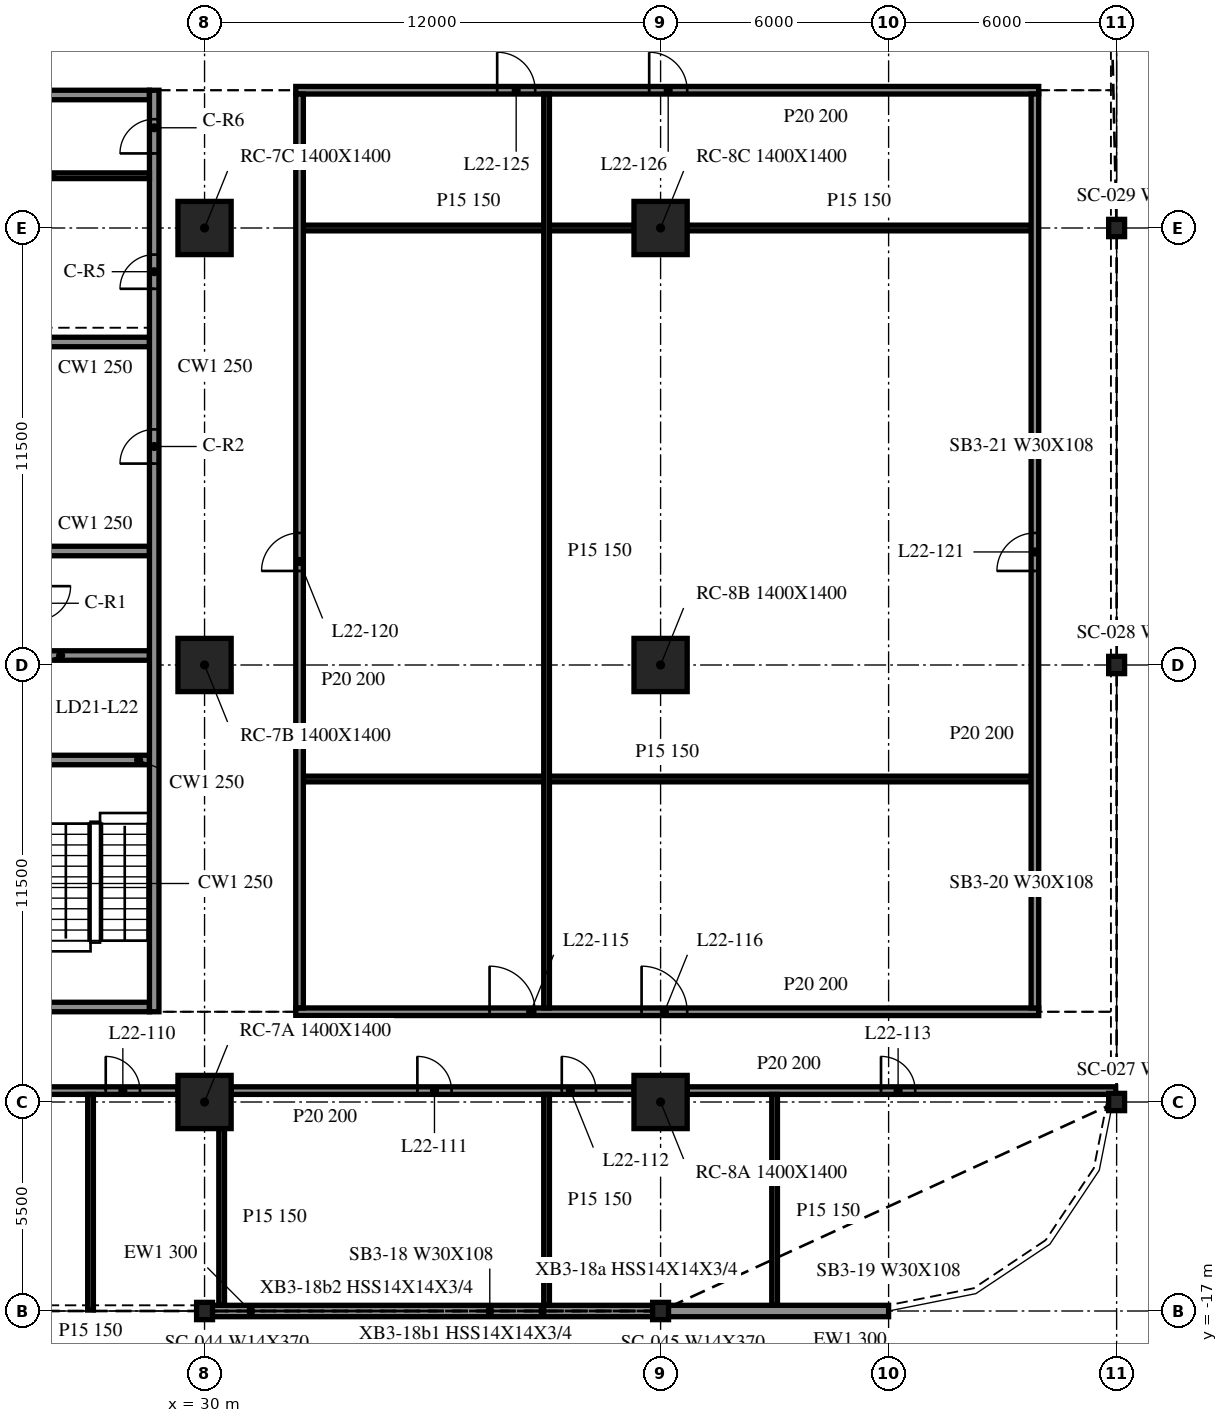
"""IFC4 building model, lengths in metres.
Left out: names, types, materials, properties, quantities, classifications, styles, units other than length and angle.
Written with IfcOpenShell. Run it as: python <this file> out.ifc"""

import sys

from ifc_helpers import new_model, si_unit, direction, frame, frame_2d, origin, origin_2d, place, context, subcontext, project, spatial, rectangle, i_section, extrude, element, fill, save


model = new_model("IFC4")
c1 = context("Model", 3, precision=1e-05, world=origin(), true_north=direction((0.0, 1.0)))
c2 = subcontext(c1, "Body", "Model", "MODEL_VIEW")
j1 = project(units=[si_unit("LENGTHUNIT", "METRE"), si_unit("PLANEANGLEUNIT", "RADIAN")], contexts=[c1])
p1 = place(None, origin())
s1 = spatial("IfcSite", under=j1, at=p1, CompositionType="ELEMENT")
p2 = place(p1, origin())
s2 = spatial("IfcBuilding", under=s1, at=p2, CompositionType="ELEMENT")
p3 = place(p2, frame((0.0, 0.0, 97.1)))
s3 = spatial("IfcBuildingStorey", under=s2, at=p3, CompositionType="ELEMENT", Elevation=97.1)
for number, where, z_axis, x_axis in (
    (1, (30.0, -11.5, -0.34), (0.0, 0.0, 1.0), (1.0, 0.0, 0.0)),
    (2, (30.0, 0.0, -0.34), (0.0, 0.0, 1.0), (1.0, 0.0, 0.0)),
    (3, (30.0, 11.5, -0.34), (0.0, 0.0, 1.0), (1.0, 0.0, 0.0)),
    (4, (42.0, -11.5, -0.34), (0.0, 0.0, 1.0), (1.0, 0.0, 0.0)),
    (5, (42.0, 0.0, -0.34), (0.0, 0.0, 1.0), (1.0, 0.0, 0.0)),
    (6, (42.0, 11.5, -0.34), (0.0, 0.0, 1.0), (1.0, 0.0, 0.0)),
):
    element("IfcColumn", number, at=place(p3, frame(where, z_axis=z_axis, x_axis=x_axis)), inside=s3, PredefinedType="COLUMN", context=c2, shape_type="SweptSolid", body=[
        extrude(rectangle(XDim=1.4, YDim=1.4, at=origin_2d()), origin(), (0.0, 0.0, 1.0), 4.1),
    ])
for number, where, z_axis, x_axis in (
    (7, (30.0, -17.0, -0.34), (0.0, 0.0, 1.0), (1.0, 0.0, 0.0)),
    (8, (42.0, -17.0, -0.34), (0.0, 0.0, 1.0), (1.0, 0.0, 0.0)),
    (9, (54.0, -11.5, -0.34), (0.0, 0.0, 1.0), (1.0, 0.0, 0.0)),
    (10, (54.0, 0.0, -0.34), (0.0, 0.0, 1.0), (1.0, 0.0, 0.0)),
    (11, (54.0, 11.5, -0.34), (0.0, 0.0, 1.0), (1.0, 0.0, 0.0)),
):
    element("IfcColumn", number, at=place(p3, frame(where, z_axis=z_axis, x_axis=x_axis)), inside=s3, PredefinedType="COLUMN", context=c2, shape_type="SweptSolid", body=[
        extrude(i_section(OverallWidth=0.419, OverallDepth=0.455, WebThickness=0.042, FlangeThickness=0.068, at=origin_2d()), origin(), (0.0, 0.0, 1.0), 4.1),
    ])
p4 = place(p3, frame((30.021, -17.0, 0.0), z_axis=(0.0, 0.0, 1.0), x_axis=(1.0, 0.0, 0.0)))
e12 = element("IfcWall", 12, at=p4, inside=s3, PredefinedType="NOTDEFINED", context=c2, shape_type="SweptSolid", body=[
    extrude(rectangle(XDim=11.958, YDim=0.3, at=frame_2d((5.979, 0.0))), origin(), (0.0, 0.0, 1.0), 3.003),
])
p5 = place(p3, frame((42.021, -17.0, 0.0), z_axis=(0.0, 0.0, 1.0), x_axis=(1.0, 0.0, 0.0)))
e13 = element("IfcWall", 13, at=p5, inside=s3, PredefinedType="NOTDEFINED", context=c2, shape_type="SweptSolid", body=[
    extrude(rectangle(XDim=5.979, YDim=0.3, at=frame_2d((2.99, 0.0))), origin(), (0.0, 0.0, 1.0), 3.003),
])
p6 = place(p3, frame((28.675, -9.125, 0.0), z_axis=(0.0, 0.0, 1.0), x_axis=(0.0, 1.0, 0.0)))
e14 = element("IfcWall", 14, at=p6, inside=s3, PredefinedType="SOLIDWALL", context=c2, shape_type="SweptSolid", body=[
    extrude(rectangle(XDim=24.25, YDim=0.25, at=frame_2d((12.125, 0.0))), origin(), (0.0, 0.0, 1.0), 3.76),
])
p7 = place(p6, frame((14.425, 0.0, 0.0)))
e15 = element("IfcOpeningElement", 15, at=p7, cuts=e14, PredefinedType="OPENING", context=c2, shape_type="SweptSolid", body=[
    extrude(rectangle(XDim=0.9, YDim=2.1, at=frame_2d((0.45, 1.05))), frame((0.0, 0.135, 0.0), z_axis=(0.0, -1.0, 0.0), x_axis=(1.0, 0.0, 0.0)), (0.0, 0.0, 1.0), 0.27),
])
p8 = place(p6, frame((19.025, 0.0, 0.0)))
e16 = element("IfcOpeningElement", 16, at=p8, cuts=e14, PredefinedType="OPENING", context=c2, shape_type="SweptSolid", body=[
    extrude(rectangle(XDim=0.9, YDim=2.1, at=frame_2d((0.45, 1.05))), frame((0.0, 0.135, 0.0), z_axis=(0.0, -1.0, 0.0), x_axis=(1.0, 0.0, 0.0)), (0.0, 0.0, 1.0), 0.27),
])
p9 = place(p6, frame((22.587, 0.0, 0.0)))
e17 = element("IfcOpeningElement", 17, at=p9, cuts=e14, PredefinedType="OPENING", context=c2, shape_type="SweptSolid", body=[
    extrude(rectangle(XDim=0.9, YDim=2.1, at=frame_2d((0.45, 1.05))), frame((0.0, 0.135, 0.0), z_axis=(0.0, -1.0, 0.0), x_axis=(1.0, 0.0, 0.0)), (0.0, 0.0, 1.0), 0.27),
])
p10 = place(p3, frame((28.55, -9.0, 0.0), z_axis=(0.0, 0.0, 1.0), x_axis=(-1.0, 0.0, 0.0)))
e18 = element("IfcWall", 18, at=p10, inside=s3, PredefinedType="SOLIDWALL", context=c2, shape_type="SweptSolid", body=[
    extrude(rectangle(XDim=9.1, YDim=0.25, at=frame_2d((4.55, 0.0))), origin(), (0.0, 0.0, 1.0), 3.76),
])
p11 = place(p10, frame((3.65, 0.0, 0.0)))
e19 = element("IfcOpeningElement", 19, at=p11, cuts=e18, PredefinedType="OPENING", context=c2, shape_type="SweptSolid", body=[
    extrude(rectangle(XDim=1.8, YDim=2.1, at=frame_2d((0.9, 1.05))), frame((0.0, 0.135, 0.0), z_axis=(0.0, -1.0, 0.0), x_axis=(1.0, 0.0, 0.0)), (0.0, 0.0, 1.0), 0.27),
])
p12 = place(p3, frame((19.45, 15.0, 0.0), z_axis=(0.0, 0.0, 1.0), x_axis=(1.0, 0.0, 0.0)))
e20 = element("IfcWall", 20, at=p12, inside=s3, PredefinedType="SOLIDWALL", context=c2, shape_type="SweptSolid", body=[
    extrude(rectangle(XDim=9.1, YDim=0.25, at=frame_2d((4.55, 0.0))), origin(), (0.0, 0.0, 1.0), 3.76),
])
p13 = place(p12, frame((3.65, 0.0, 0.0)))
e21 = element("IfcOpeningElement", 21, at=p13, cuts=e20, PredefinedType="OPENING", context=c2, shape_type="SweptSolid", body=[
    extrude(rectangle(XDim=1.8, YDim=2.1, at=frame_2d((0.9, 1.05))), frame((0.0, 0.135, 0.0), z_axis=(0.0, -1.0, 0.0), x_axis=(1.0, 0.0, 0.0)), (0.0, 0.0, 1.0), 0.27),
])
for number, where, z_axis, x_axis in (
    (22, (25.7, -2.5, 0.0), (0.0, 0.0, 1.0), (1.0, 0.0, 0.0)),
    (23, (25.7, 0.25, 0.0), (0.0, 0.0, 1.0), (1.0, 0.0, 0.0)),
    (24, (25.7, 3.0, 0.0), (0.0, 0.0, 1.0), (1.0, 0.0, 0.0)),
    (25, (25.7, 8.5, 0.0), (0.0, 0.0, 1.0), (1.0, 0.0, 0.0)),
):
    element("IfcWall", number, at=place(p3, frame(where, z_axis=z_axis, x_axis=x_axis)), inside=s3, PredefinedType="SOLIDWALL", context=c2, shape_type="SweptSolid", body=[
        extrude(rectangle(XDim=2.85, YDim=0.25, at=frame_2d((1.425, 0.0))), origin(), (0.0, 0.0, 1.0), 3.76),
    ])
p14 = place(p3, frame((25.7, 12.875, 0.0), z_axis=(0.0, 0.0, 1.0), x_axis=(1.0, 0.0, 0.0)))
e26 = element("IfcWall", 26, at=p14, inside=s3, PredefinedType="PARTITIONING", context=c2, shape_type="SweptSolid", body=[
    extrude(rectangle(XDim=2.85, YDim=0.15, at=frame_2d((1.425, 0.0))), origin(), (0.0, 0.0, 1.0), 3.76),
])
p15 = place(p3, frame((18.7, -11.2, 0.0), z_axis=(0.0, 0.0, 1.0), x_axis=(1.0, 0.0, 0.0)))
e27 = element("IfcWall", 27, at=p15, inside=s3, PredefinedType="PARTITIONING", context=c2, shape_type="SweptSolid", body=[
    extrude(rectangle(XDim=10.6, YDim=0.2, at=frame_2d((5.3, 0.0))), origin(), (0.0, 0.0, 1.0), 3.76),
])
p16 = place(p15, frame((4.9, 0.0, 0.0)))
e28 = element("IfcOpeningElement", 28, at=p16, cuts=e27, PredefinedType="OPENING", context=c2, shape_type="SweptSolid", body=[
    extrude(rectangle(XDim=0.9, YDim=2.1, at=frame_2d((0.45, 1.05))), frame((0.0, 0.11, 0.0), z_axis=(0.0, -1.0, 0.0), x_axis=(1.0, 0.0, 0.0)), (0.0, 0.0, 1.0), 0.22),
])
p17 = place(p15, frame((8.7, 0.0, 0.0)))
e29 = element("IfcOpeningElement", 29, at=p17, cuts=e27, PredefinedType="OPENING", context=c2, shape_type="SweptSolid", body=[
    extrude(rectangle(XDim=0.9, YDim=2.1, at=frame_2d((0.45, 1.05))), frame((0.0, 0.11, 0.0), z_axis=(0.0, -1.0, 0.0), x_axis=(1.0, 0.0, 0.0)), (0.0, 0.0, 1.0), 0.22),
])
p18 = place(p3, frame((30.7, -11.2, 0.0), z_axis=(0.0, 0.0, 1.0), x_axis=(1.0, 0.0, 0.0)))
e30 = element("IfcWall", 30, at=p18, inside=s3, PredefinedType="PARTITIONING", context=c2, shape_type="SweptSolid", body=[
    extrude(rectangle(XDim=10.6, YDim=0.2, at=frame_2d((5.3, 0.0))), origin(), (0.0, 0.0, 1.0), 3.76),
])
p19 = place(p18, frame((4.9, 0.0, 0.0)))
e31 = element("IfcOpeningElement", 31, at=p19, cuts=e30, PredefinedType="OPENING", context=c2, shape_type="SweptSolid", body=[
    extrude(rectangle(XDim=0.9, YDim=2.1, at=frame_2d((0.45, 1.05))), frame((0.0, 0.11, 0.0), z_axis=(0.0, -1.0, 0.0), x_axis=(1.0, 0.0, 0.0)), (0.0, 0.0, 1.0), 0.22),
])
p20 = place(p18, frame((8.7, 0.0, 0.0)))
e32 = element("IfcOpeningElement", 32, at=p20, cuts=e30, PredefinedType="OPENING", context=c2, shape_type="SweptSolid", body=[
    extrude(rectangle(XDim=0.9, YDim=2.1, at=frame_2d((0.45, 1.05))), frame((0.0, 0.11, 0.0), z_axis=(0.0, -1.0, 0.0), x_axis=(1.0, 0.0, 0.0)), (0.0, 0.0, 1.0), 0.22),
])
p21 = place(p3, frame((42.7, -11.2, 0.0), z_axis=(0.0, 0.0, 1.0), x_axis=(1.0, 0.0, 0.0)))
e33 = element("IfcWall", 33, at=p21, inside=s3, PredefinedType="PARTITIONING", context=c2, shape_type="SweptSolid", body=[
    extrude(rectangle(XDim=11.275, YDim=0.2, at=frame_2d((5.638, 0.0))), origin(), (0.0, 0.0, 1.0), 3.76),
])
p22 = place(p21, frame((5.1, 0.0, 0.0)))
e34 = element("IfcOpeningElement", 34, at=p22, cuts=e33, PredefinedType="OPENING", context=c2, shape_type="SweptSolid", body=[
    extrude(rectangle(XDim=0.9, YDim=2.1, at=frame_2d((0.45, 1.05))), frame((0.0, 0.11, 0.0), z_axis=(0.0, -1.0, 0.0), x_axis=(1.0, 0.0, 0.0)), (0.0, 0.0, 1.0), 0.22),
])
p23 = place(p3, frame((32.4, -9.125, 0.0), z_axis=(0.0, 0.0, 1.0), x_axis=(1.0, 0.0, 0.0)))
e35 = element("IfcWall", 35, at=p23, inside=s3, PredefinedType="PARTITIONING", context=c2, shape_type="SweptSolid", body=[
    extrude(rectangle(XDim=19.55, YDim=0.2, at=frame_2d((9.775, 0.0))), origin(), (0.0, 0.0, 1.0), 3.76),
])
p24 = place(p23, frame((5.1, 0.0, 0.0)))
e36 = element("IfcOpeningElement", 36, at=p24, cuts=e35, PredefinedType="OPENING", context=c2, shape_type="SweptSolid", body=[
    extrude(rectangle(XDim=1.2, YDim=2.1, at=frame_2d((0.6, 1.05))), frame((0.0, 0.11, 0.0), z_axis=(0.0, -1.0, 0.0), x_axis=(1.0, 0.0, 0.0)), (0.0, 0.0, 1.0), 0.22),
])
p25 = place(p23, frame((9.1, 0.0, 0.0)))
e37 = element("IfcOpeningElement", 37, at=p25, cuts=e35, PredefinedType="OPENING", context=c2, shape_type="SweptSolid", body=[
    extrude(rectangle(XDim=1.2, YDim=2.1, at=frame_2d((0.6, 1.05))), frame((0.0, 0.11, 0.0), z_axis=(0.0, -1.0, 0.0), x_axis=(1.0, 0.0, 0.0)), (0.0, 0.0, 1.0), 0.22),
])
p26 = place(p3, frame((32.6, -3.0, 0.0), z_axis=(0.0, 0.0, 1.0), x_axis=(1.0, 0.0, 0.0)))
e38 = element("IfcWall", 38, at=p26, inside=s3, PredefinedType="PARTITIONING", context=c2, shape_type="SweptSolid", body=[
    extrude(rectangle(XDim=19.15, YDim=0.15, at=frame_2d((9.575, 0.0))), origin(), (0.0, 0.0, 1.0), 3.76),
])
p27 = place(p3, frame((32.6, 11.5, 0.0), z_axis=(0.0, 0.0, 1.0), x_axis=(1.0, 0.0, 0.0)))
e39 = element("IfcWall", 39, at=p27, inside=s3, PredefinedType="PARTITIONING", context=c2, shape_type="SweptSolid", body=[
    extrude(rectangle(XDim=8.7, YDim=0.15, at=frame_2d((4.35, 0.0))), origin(), (0.0, 0.0, 1.0), 3.76),
])
p28 = place(p3, frame((42.7, 11.5, 0.0), z_axis=(0.0, 0.0, 1.0), x_axis=(1.0, 0.0, 0.0)))
e40 = element("IfcWall", 40, at=p28, inside=s3, PredefinedType="PARTITIONING", context=c2, shape_type="SweptSolid", body=[
    extrude(rectangle(XDim=9.05, YDim=0.15, at=frame_2d((4.525, 0.0))), origin(), (0.0, 0.0, 1.0), 3.76),
])
p29 = place(p3, frame((32.4, 15.125, 0.0), z_axis=(0.0, 0.0, 1.0), x_axis=(1.0, 0.0, 0.0)))
e41 = element("IfcWall", 41, at=p29, inside=s3, PredefinedType="PARTITIONING", context=c2, shape_type="SweptSolid", body=[
    extrude(rectangle(XDim=19.55, YDim=0.2, at=frame_2d((9.775, 0.0))), origin(), (0.0, 0.0, 1.0), 3.76),
])
p30 = place(p29, frame((5.3, 0.0, 0.0)))
e42 = element("IfcOpeningElement", 42, at=p30, cuts=e41, PredefinedType="OPENING", context=c2, shape_type="SweptSolid", body=[
    extrude(rectangle(XDim=1.0, YDim=2.1, at=frame_2d((0.5, 1.05))), frame((0.0, 0.11, 0.0), z_axis=(0.0, -1.0, 0.0), x_axis=(1.0, 0.0, 0.0)), (0.0, 0.0, 1.0), 0.22),
])
p31 = place(p29, frame((9.3, 0.0, 0.0)))
e43 = element("IfcOpeningElement", 43, at=p31, cuts=e41, PredefinedType="OPENING", context=c2, shape_type="SweptSolid", body=[
    extrude(rectangle(XDim=1.0, YDim=2.1, at=frame_2d((0.5, 1.05))), frame((0.0, 0.11, 0.0), z_axis=(0.0, -1.0, 0.0), x_axis=(1.0, 0.0, 0.0)), (0.0, 0.0, 1.0), 0.22),
])
p32 = place(p3, frame((27.0, -16.975, 0.0), z_axis=(0.0, 0.0, 1.0), x_axis=(0.0, 1.0, 0.0)))
e44 = element("IfcWall", 44, at=p32, inside=s3, PredefinedType="PARTITIONING", context=c2, shape_type="SweptSolid", body=[
    extrude(rectangle(XDim=5.675, YDim=0.15, at=frame_2d((2.837, 0.0))), origin(), (0.0, 0.0, 1.0), 3.76),
])
p33 = place(p3, frame((30.45, -16.85, 0.0), z_axis=(0.0, 0.0, 1.0), x_axis=(0.0, 1.0, 0.0)))
e45 = element("IfcWall", 45, at=p33, inside=s3, PredefinedType="PARTITIONING", context=c2, shape_type="SweptSolid", body=[
    extrude(rectangle(XDim=4.65, YDim=0.15, at=frame_2d((2.325, 0.0))), origin(), (0.0, 0.0, 1.0), 3.76),
])
p34 = place(p3, frame((32.5, -9.025, 0.0), z_axis=(0.0, 0.0, 1.0), x_axis=(0.0, 1.0, 0.0)))
e46 = element("IfcWall", 46, at=p34, inside=s3, PredefinedType="PARTITIONING", context=c2, shape_type="SweptSolid", body=[
    extrude(rectangle(XDim=24.05, YDim=0.2, at=frame_2d((12.025, 0.0))), origin(), (0.0, 0.0, 1.0), 3.76),
])
p35 = place(p34, frame((11.5, 0.0, 0.0)))
e47 = element("IfcOpeningElement", 47, at=p35, cuts=e46, PredefinedType="OPENING", context=c2, shape_type="SweptSolid", body=[
    extrude(rectangle(XDim=1.0, YDim=2.1, at=frame_2d((0.5, 1.05))), frame((0.0, 0.11, 0.0), z_axis=(0.0, -1.0, 0.0), x_axis=(1.0, 0.0, 0.0)), (0.0, 0.0, 1.0), 0.22),
])
p36 = place(p3, frame((39.0, -16.85, 0.0), z_axis=(0.0, 0.0, 1.0), x_axis=(0.0, 1.0, 0.0)))
e48 = element("IfcWall", 48, at=p36, inside=s3, PredefinedType="PARTITIONING", context=c2, shape_type="SweptSolid", body=[
    extrude(rectangle(XDim=5.55, YDim=0.15, at=frame_2d((2.775, 0.0))), origin(), (0.0, 0.0, 1.0), 3.76),
])
p37 = place(p3, frame((39.0, -9.025, 0.0), z_axis=(0.0, 0.0, 1.0), x_axis=(0.0, 1.0, 0.0)))
e49 = element("IfcWall", 49, at=p37, inside=s3, PredefinedType="PARTITIONING", context=c2, shape_type="SweptSolid", body=[
    extrude(rectangle(XDim=24.05, YDim=0.15, at=frame_2d((12.025, 0.0))), origin(), (0.0, 0.0, 1.0), 3.76),
])
p38 = place(p3, frame((45.0, -16.85, 0.0), z_axis=(0.0, 0.0, 1.0), x_axis=(0.0, 1.0, 0.0)))
e50 = element("IfcWall", 50, at=p38, inside=s3, PredefinedType="PARTITIONING", context=c2, shape_type="SweptSolid", body=[
    extrude(rectangle(XDim=5.55, YDim=0.15, at=frame_2d((2.775, 0.0))), origin(), (0.0, 0.0, 1.0), 3.76),
])
p39 = place(p3, frame((51.85, -9.025, 0.0), z_axis=(0.0, 0.0, 1.0), x_axis=(0.0, 1.0, 0.0)))
e51 = element("IfcWall", 51, at=p39, inside=s3, PredefinedType="PARTITIONING", context=c2, shape_type="SweptSolid", body=[
    extrude(rectangle(XDim=24.05, YDim=0.2, at=frame_2d((12.025, 0.0))), origin(), (0.0, 0.0, 1.0), 3.76),
])
p40 = place(p39, frame((11.5, 0.0, 0.0)))
e52 = element("IfcOpeningElement", 52, at=p40, cuts=e51, PredefinedType="OPENING", context=c2, shape_type="SweptSolid", body=[
    extrude(rectangle(XDim=1.0, YDim=2.1, at=frame_2d((0.5, 1.05))), frame((0.0, 0.11, 0.0), z_axis=(0.0, -1.0, 0.0), x_axis=(1.0, 0.0, 0.0)), (0.0, 0.0, 1.0), 0.22),
])
p41 = place(p7, origin())
e53 = element("IfcDoor", 53, at=p41, inside=s3, OperationType="SINGLE_SWING_RIGHT", PredefinedType="DOOR", context=c2, shape_type="SweptSolid", body=[
    extrude(rectangle(XDim=0.9, YDim=2.1, at=frame_2d((0.45, 1.05))), frame((0.0, 0.025, 0.0), z_axis=(0.0, -1.0, 0.0), x_axis=(1.0, 0.0, 0.0)), (0.0, 0.0, 1.0), 0.05),
])
fill(e15, e53)
p42 = place(p8, origin())
e54 = element("IfcDoor", 54, at=p42, inside=s3, OperationType="SINGLE_SWING_LEFT", PredefinedType="DOOR", context=c2, shape_type="SweptSolid", body=[
    extrude(rectangle(XDim=0.9, YDim=2.1, at=frame_2d((0.45, 1.05))), frame((0.0, 0.025, 0.0), z_axis=(0.0, -1.0, 0.0), x_axis=(1.0, 0.0, 0.0)), (0.0, 0.0, 1.0), 0.05),
])
fill(e16, e54)
p43 = place(p9, origin())
e55 = element("IfcDoor", 55, at=p43, inside=s3, OperationType="SINGLE_SWING_RIGHT", PredefinedType="DOOR", context=c2, shape_type="SweptSolid", body=[
    extrude(rectangle(XDim=0.9, YDim=2.1, at=frame_2d((0.45, 1.05))), frame((0.0, 0.025, 0.0), z_axis=(0.0, -1.0, 0.0), x_axis=(1.0, 0.0, 0.0)), (0.0, 0.0, 1.0), 0.05),
])
fill(e17, e55)
p44 = place(p17, origin())
e56 = element("IfcDoor", 56, at=p44, inside=s3, OperationType="SINGLE_SWING_LEFT", PredefinedType="DOOR", context=c2, shape_type="SweptSolid", body=[
    extrude(rectangle(XDim=0.9, YDim=2.1, at=frame_2d((0.45, 1.05))), frame((0.0, 0.025, 0.0), z_axis=(0.0, -1.0, 0.0), x_axis=(1.0, 0.0, 0.0)), (0.0, 0.0, 1.0), 0.05),
])
fill(e29, e56)
p45 = place(p19, origin())
e57 = element("IfcDoor", 57, at=p45, inside=s3, OperationType="SINGLE_SWING_LEFT", PredefinedType="DOOR", context=c2, shape_type="SweptSolid", body=[
    extrude(rectangle(XDim=0.9, YDim=2.1, at=frame_2d((0.45, 1.05))), frame((0.0, 0.025, 0.0), z_axis=(0.0, -1.0, 0.0), x_axis=(1.0, 0.0, 0.0)), (0.0, 0.0, 1.0), 0.05),
])
fill(e31, e57)
p46 = place(p20, origin())
e58 = element("IfcDoor", 58, at=p46, inside=s3, OperationType="SINGLE_SWING_LEFT", PredefinedType="DOOR", context=c2, shape_type="SweptSolid", body=[
    extrude(rectangle(XDim=0.9, YDim=2.1, at=frame_2d((0.45, 1.05))), frame((0.0, 0.025, 0.0), z_axis=(0.0, -1.0, 0.0), x_axis=(1.0, 0.0, 0.0)), (0.0, 0.0, 1.0), 0.05),
])
fill(e32, e58)
p47 = place(p22, origin())
e59 = element("IfcDoor", 59, at=p47, inside=s3, OperationType="SINGLE_SWING_RIGHT", PredefinedType="DOOR", context=c2, shape_type="SweptSolid", body=[
    extrude(rectangle(XDim=0.9, YDim=2.1, at=frame_2d((0.45, 1.05))), frame((0.0, 0.025, 0.0), z_axis=(0.0, -1.0, 0.0), x_axis=(1.0, 0.0, 0.0)), (0.0, 0.0, 1.0), 0.05),
])
fill(e34, e59)
p48 = place(p24, origin())
e60 = element("IfcDoor", 60, at=p48, inside=s3, OperationType="SINGLE_SWING_LEFT", PredefinedType="DOOR", context=c2, shape_type="SweptSolid", body=[
    extrude(rectangle(XDim=1.2, YDim=2.1, at=frame_2d((0.6, 1.05))), frame((0.0, 0.025, 0.0), z_axis=(0.0, -1.0, 0.0), x_axis=(1.0, 0.0, 0.0)), (0.0, 0.0, 1.0), 0.05),
])
fill(e36, e60)
p49 = place(p25, origin())
e61 = element("IfcDoor", 61, at=p49, inside=s3, OperationType="SINGLE_SWING_LEFT", PredefinedType="DOOR", context=c2, shape_type="SweptSolid", body=[
    extrude(rectangle(XDim=1.2, YDim=2.1, at=frame_2d((0.6, 1.05))), frame((0.0, 0.025, 0.0), z_axis=(0.0, -1.0, 0.0), x_axis=(1.0, 0.0, 0.0)), (0.0, 0.0, 1.0), 0.05),
])
fill(e37, e61)
p50 = place(p35, origin())
e62 = element("IfcDoor", 62, at=p50, inside=s3, OperationType="SINGLE_SWING_RIGHT", PredefinedType="DOOR", context=c2, shape_type="SweptSolid", body=[
    extrude(rectangle(XDim=1.0, YDim=2.1, at=frame_2d((0.5, 1.05))), frame((0.0, 0.025, 0.0), z_axis=(0.0, -1.0, 0.0), x_axis=(1.0, 0.0, 0.0)), (0.0, 0.0, 1.0), 0.05),
])
fill(e47, e62)
p51 = place(p40, origin())
e63 = element("IfcDoor", 63, at=p51, inside=s3, OperationType="SINGLE_SWING_LEFT", PredefinedType="DOOR", context=c2, shape_type="SweptSolid", body=[
    extrude(rectangle(XDim=1.0, YDim=2.1, at=frame_2d((0.5, 1.05))), frame((0.0, 0.025, 0.0), z_axis=(0.0, -1.0, 0.0), x_axis=(1.0, 0.0, 0.0)), (0.0, 0.0, 1.0), 0.05),
])
fill(e52, e63)
p52 = place(p30, origin())
e64 = element("IfcDoor", 64, at=p52, inside=s3, OperationType="SINGLE_SWING_RIGHT", PredefinedType="DOOR", context=c2, shape_type="SweptSolid", body=[
    extrude(rectangle(XDim=1.0, YDim=2.1, at=frame_2d((0.5, 1.05))), frame((0.0, 0.025, 0.0), z_axis=(0.0, -1.0, 0.0), x_axis=(1.0, 0.0, 0.0)), (0.0, 0.0, 1.0), 0.05),
])
fill(e42, e64)
p53 = place(p31, origin())
e65 = element("IfcDoor", 65, at=p53, inside=s3, OperationType="SINGLE_SWING_LEFT", PredefinedType="DOOR", context=c2, shape_type="SweptSolid", body=[
    extrude(rectangle(XDim=1.0, YDim=2.1, at=frame_2d((0.5, 1.05))), frame((0.0, 0.025, 0.0), z_axis=(0.0, -1.0, 0.0), x_axis=(1.0, 0.0, 0.0)), (0.0, 0.0, 1.0), 0.05),
])
fill(e43, e65)
save(model, sys.argv[1])
